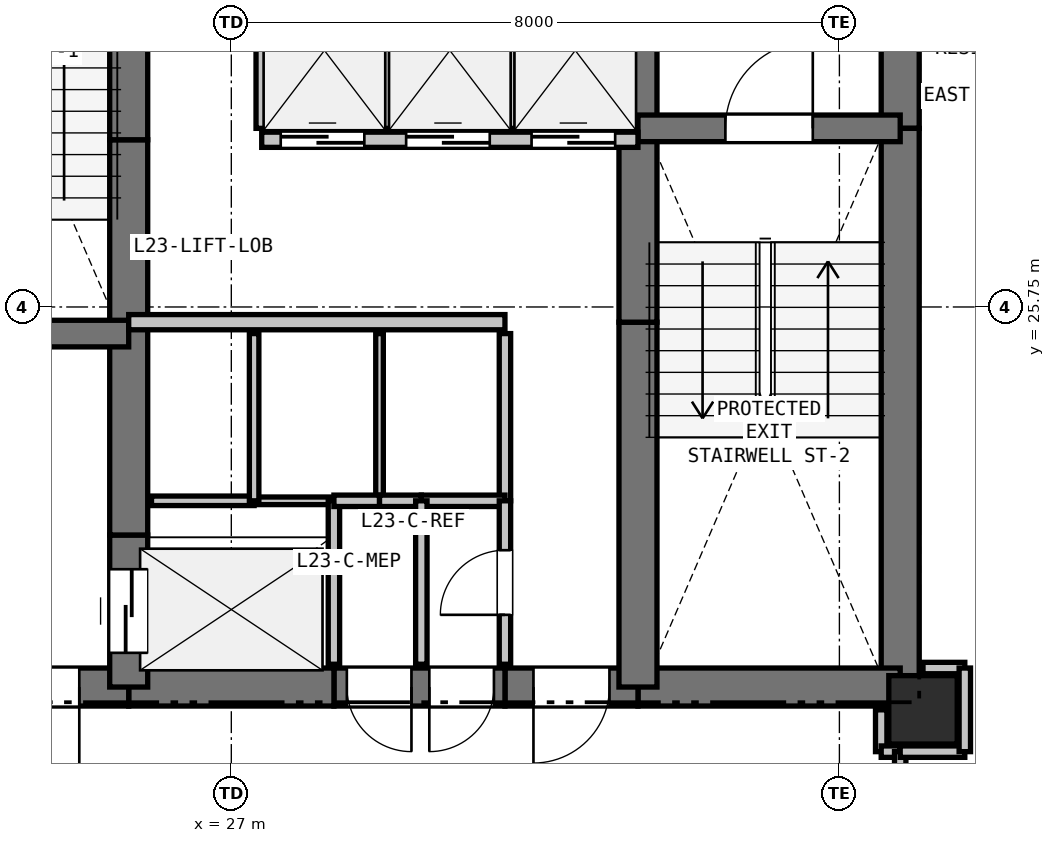
"""IFC4 building model, lengths in metres.
Left out: names, types, materials, properties, quantities, classifications, styles, units other than length and angle.
Written with IfcOpenShell. Run it as: python <this file> out.ifc"""

import sys

from ifc_helpers import new_model, si_unit, direction, frame, frame_2d, origin, origin_2d, place, context, subcontext, project, spatial, rectangle, extrude, element, fill, save


model = new_model("IFC4")
c1 = context("Model", 3, precision=1e-05, world=origin(), true_north=direction((0.0, 1.0)))
c2 = subcontext(c1, "Body", "Model", "MODEL_VIEW")
j1 = project(units=[si_unit("LENGTHUNIT", "METRE"), si_unit("PLANEANGLEUNIT", "RADIAN")], contexts=[c1])
p1 = place(None, origin())
s1 = spatial("IfcSite", under=j1, at=p1, CompositionType="ELEMENT")
p2 = place(p1, origin())
s2 = spatial("IfcBuilding", under=s1, at=p2, CompositionType="ELEMENT")
p3 = place(p2, frame((0.0, 0.0, 86.7)))
s3 = spatial("IfcBuildingStorey", under=s2, at=p3, CompositionType="ELEMENT", Elevation=86.7)
p4 = place(p3, frame((36.1, 20.45, 0.0), z_axis=(0.0, 0.0, 1.0), x_axis=(1.0, 0.0, 0.0)))
e1 = element("IfcColumn", 1, at=p4, inside=s3, PredefinedType="COLUMN", context=c2, shape_type="SweptSolid", body=[
    extrude(rectangle(XDim=0.9, YDim=0.9, at=origin_2d()), origin(), (0.0, 0.0, 1.0), 3.3),
])
p5 = place(p3, frame((35.8, 32.75, 0.0), z_axis=(0.0, 0.0, 1.0), x_axis=(0.0, -1.0, 0.0)))
e2 = element("IfcWall", 2, at=p5, inside=s3, PredefinedType="SHEAR", context=c2, shape_type="SweptSolid", body=[
    extrude(rectangle(XDim=4.65, YDim=0.5, at=frame_2d((2.325, 0.0))), origin(), (0.0, 0.0, 1.0), 3.05),
])
p6 = place(p3, frame((35.8, 28.1, 0.0), z_axis=(0.0, 0.0, 1.0), x_axis=(0.0, -1.0, 0.0)))
e3 = element("IfcWall", 3, at=p6, inside=s3, PredefinedType="SHEAR", context=c2, shape_type="SweptSolid", body=[
    extrude(rectangle(XDim=7.35, YDim=0.5, at=frame_2d((3.675, 0.0))), origin(), (0.0, 0.0, 1.0), 3.05),
])
p7 = place(p3, frame((35.8, 20.75, 0.0), z_axis=(0.0, 0.0, 1.0), x_axis=(-1.0, 0.0, 0.0)))
e4 = element("IfcWall", 4, at=p7, inside=s3, PredefinedType="SHEAR", context=c2, shape_type="SweptSolid", body=[
    extrude(rectangle(XDim=3.45, YDim=0.5, at=frame_2d((1.725, 0.0))), origin(), (0.0, 0.0, 1.0), 3.05),
])
p8 = place(p3, frame((32.35, 20.75, 0.0), z_axis=(0.0, 0.0, 1.0), x_axis=(-1.0, 0.0, 0.0)))
e5 = element("IfcWall", 5, at=p8, inside=s3, PredefinedType="SHEAR", context=c2, shape_type="SweptSolid", body=[
    extrude(rectangle(XDim=1.75, YDim=0.5, at=frame_2d((0.875, 0.0))), origin(), (0.0, 0.0, 1.0), 3.05),
])
p9 = place(p8, frame((0.375, 0.0, 0.0)))
e6 = element("IfcOpeningElement", 6, at=p9, cuts=e5, PredefinedType="OPENING", context=c2, shape_type="SweptSolid", body=[
    extrude(rectangle(XDim=1.0, YDim=2.15, at=frame_2d((0.5, 1.075))), frame((0.0, 0.26, 0.0), z_axis=(0.0, -1.0, 0.0), x_axis=(1.0, 0.0, 0.0)), (0.0, 0.0, 1.0), 0.52),
])
p10 = place(p3, frame((30.6, 20.75, 0.0), z_axis=(0.0, 0.0, 1.0), x_axis=(-1.0, 0.0, 0.0)))
e7 = element("IfcWall", 7, at=p10, inside=s3, PredefinedType="SHEAR", context=c2, shape_type="SweptSolid", body=[
    extrude(rectangle(XDim=2.25, YDim=0.5, at=frame_2d((1.125, 0.0))), origin(), (0.0, 0.0, 1.0), 3.05),
])
p11 = place(p10, frame((1.23, 0.0, 0.0)))
e8 = element("IfcOpeningElement", 8, at=p11, cuts=e7, PredefinedType="OPENING", context=c2, shape_type="SweptSolid", body=[
    extrude(rectangle(XDim=0.85, YDim=2.1, at=frame_2d((0.425, 1.05))), frame((0.0, 0.26, 0.0), z_axis=(0.0, -1.0, 0.0), x_axis=(1.0, 0.0, 0.0)), (0.0, 0.0, 1.0), 0.52),
])
p12 = place(p10, frame((0.145, 0.0, 0.0)))
e9 = element("IfcOpeningElement", 9, at=p12, cuts=e7, PredefinedType="OPENING", context=c2, shape_type="SweptSolid", body=[
    extrude(rectangle(XDim=0.85, YDim=2.1, at=frame_2d((0.425, 1.05))), frame((0.0, 0.26, 0.0), z_axis=(0.0, -1.0, 0.0), x_axis=(1.0, 0.0, 0.0)), (0.0, 0.0, 1.0), 0.52),
])
p13 = place(p3, frame((28.35, 20.75, 0.0), z_axis=(0.0, 0.0, 1.0), x_axis=(-1.0, 0.0, 0.0)))
e10 = element("IfcWall", 10, at=p13, inside=s3, PredefinedType="SHEAR", context=c2, shape_type="SweptSolid", body=[
    extrude(rectangle(XDim=2.7, YDim=0.5, at=frame_2d((1.35, 0.0))), origin(), (0.0, 0.0, 1.0), 3.05),
])
p14 = place(p3, frame((25.65, 20.75, 0.0), z_axis=(0.0, 0.0, 1.0), x_axis=(-1.0, 0.0, 0.0)))
e11 = element("IfcWall", 11, at=p14, inside=s3, PredefinedType="SHEAR", context=c2, shape_type="SweptSolid", body=[
    extrude(rectangle(XDim=3.45, YDim=0.5, at=frame_2d((1.725, 0.0))), origin(), (0.0, 0.0, 1.0), 3.05),
])
p15 = place(p14, frame((0.65, 0.0, 0.0)))
e12 = element("IfcOpeningElement", 12, at=p15, cuts=e11, PredefinedType="OPENING", context=c2, shape_type="SweptSolid", body=[
    extrude(rectangle(XDim=1.15, YDim=2.15, at=frame_2d((0.575, 1.075))), frame((0.0, 0.26, 0.0), z_axis=(0.0, -1.0, 0.0), x_axis=(1.0, 0.0, 0.0)), (0.0, 0.0, 1.0), 0.52),
])
p16 = place(p3, frame((25.65, 20.75, 0.0), z_axis=(0.0, 0.0, 1.0), x_axis=(0.0, 1.0, 0.0)))
e13 = element("IfcWall", 13, at=p16, inside=s3, PredefinedType="SHEAR", context=c2, shape_type="SweptSolid", body=[
    extrude(rectangle(XDim=2.0, YDim=0.5, at=frame_2d((1.0, 0.0))), origin(), (0.0, 0.0, 1.0), 3.05),
])
p17 = place(p16, frame((0.45, 0.0, 0.0)))
e14 = element("IfcOpeningElement", 14, at=p17, cuts=e13, PredefinedType="OPENING", context=c2, shape_type="SweptSolid", body=[
    extrude(rectangle(XDim=1.1, YDim=2.15, at=frame_2d((0.55, 1.075))), frame((0.0, 0.26, 0.0), z_axis=(0.0, -1.0, 0.0), x_axis=(1.0, 0.0, 0.0)), (0.0, 0.0, 1.0), 0.52),
])
p18 = place(p3, frame((25.65, 22.75, 0.0), z_axis=(0.0, 0.0, 1.0), x_axis=(0.0, 1.0, 0.0)))
e15 = element("IfcWall", 15, at=p18, inside=s3, PredefinedType="SHEAR", context=c2, shape_type="SweptSolid", body=[
    extrude(rectangle(XDim=2.8, YDim=0.5, at=frame_2d((1.4, 0.0))), origin(), (0.0, 0.0, 1.0), 3.05),
])
p19 = place(p3, frame((25.65, 25.55, 0.0), z_axis=(0.0, 0.0, 1.0), x_axis=(0.0, 1.0, 0.0)))
e16 = element("IfcWall", 16, at=p19, inside=s3, PredefinedType="SHEAR", context=c2, shape_type="SweptSolid", body=[
    extrude(rectangle(XDim=2.4, YDim=0.5, at=frame_2d((1.2, 0.0))), origin(), (0.0, 0.0, 1.0), 3.05),
])
for number, where, z_axis, x_axis in (
    (17, (25.65, 27.95, 0.0), (0.0, 0.0, 1.0), (0.0, 1.0, 0.0)),
    (18, (32.35, 20.75, 0.0), (0.0, 0.0, 1.0), (0.0, 1.0, 0.0)),
):
    element("IfcWall", number, at=place(p3, frame(where, z_axis=z_axis, x_axis=x_axis)), inside=s3, PredefinedType="SHEAR", context=c2, shape_type="SweptSolid", body=[
        extrude(rectangle(XDim=4.8, YDim=0.5, at=frame_2d((2.4, 0.0))), origin(), (0.0, 0.0, 1.0), 3.05),
    ])
p20 = place(p3, frame((32.35, 25.55, 0.0), z_axis=(0.0, 0.0, 1.0), x_axis=(0.0, 1.0, 0.0)))
e19 = element("IfcWall", 19, at=p20, inside=s3, PredefinedType="SHEAR", context=c2, shape_type="SweptSolid", body=[
    extrude(rectangle(XDim=2.4, YDim=0.5, at=frame_2d((1.2, 0.0))), origin(), (0.0, 0.0, 1.0), 3.05),
])
p21 = place(p3, frame((32.35, 27.95, 0.0), z_axis=(0.0, 0.0, 1.0), x_axis=(0.0, 1.0, 0.0)))
e20 = element("IfcWall", 20, at=p21, inside=s3, PredefinedType="SHEAR", context=c2, shape_type="SweptSolid", body=[
    extrude(rectangle(XDim=2.8, YDim=0.5, at=frame_2d((1.4, 0.0))), origin(), (0.0, 0.0, 1.0), 3.05),
])
p22 = place(p3, frame((22.2, 25.4, 0.0), z_axis=(0.0, 0.0, 1.0), x_axis=(1.0, 0.0, 0.0)))
e21 = element("IfcWall", 21, at=p22, inside=s3, PredefinedType="SHEAR", context=c2, shape_type="SweptSolid", body=[
    extrude(rectangle(XDim=3.45, YDim=0.35, at=frame_2d((1.725, 0.0))), origin(), (0.0, 0.0, 1.0), 3.05),
])
p23 = place(p22, frame((1.15, 0.0, 0.0)))
e22 = element("IfcOpeningElement", 22, at=p23, cuts=e21, PredefinedType="OPENING", context=c2, shape_type="SweptSolid", body=[
    extrude(rectangle(XDim=1.15, YDim=2.15, at=frame_2d((0.575, 1.075))), frame((0.0, 0.185, 0.0), z_axis=(0.0, -1.0, 0.0), x_axis=(1.0, 0.0, 0.0)), (0.0, 0.0, 1.0), 0.37),
])
p24 = place(p3, frame((32.35, 28.1, 0.0), z_axis=(0.0, 0.0, 1.0), x_axis=(1.0, 0.0, 0.0)))
e23 = element("IfcWall", 23, at=p24, inside=s3, PredefinedType="SHEAR", context=c2, shape_type="SweptSolid", body=[
    extrude(rectangle(XDim=3.45, YDim=0.35, at=frame_2d((1.725, 0.0))), origin(), (0.0, 0.0, 1.0), 3.05),
])
p25 = place(p24, frame((1.15, 0.0, 0.0)))
e24 = element("IfcOpeningElement", 24, at=p25, cuts=e23, PredefinedType="OPENING", context=c2, shape_type="SweptSolid", body=[
    extrude(rectangle(XDim=1.15, YDim=2.15, at=frame_2d((0.575, 1.075))), frame((0.0, 0.185, 0.0), z_axis=(0.0, -1.0, 0.0), x_axis=(1.0, 0.0, 0.0)), (0.0, 0.0, 1.0), 0.37),
])
p26 = place(p3, frame((25.65, 25.55, 0.0), z_axis=(0.0, 0.0, 1.0), x_axis=(1.0, 0.0, 0.0)))
e25 = element("IfcWall", 25, at=p26, inside=s3, PredefinedType="PARTITIONING", context=c2, shape_type="SweptSolid", body=[
    extrude(rectangle(XDim=4.95, YDim=0.2, at=frame_2d((2.475, 0.0))), origin(), (0.0, 0.0, 1.0), 3.05),
])
p27 = place(p3, frame((27.4, 27.95, 0.0), z_axis=(0.0, 0.0, 1.0), x_axis=(1.0, 0.0, 0.0)))
e26 = element("IfcWall", 26, at=p27, inside=s3, PredefinedType="PARTITIONING", context=c2, shape_type="SweptSolid", body=[
    extrude(rectangle(XDim=4.95, YDim=0.2, at=frame_2d((2.475, 0.0))), origin(), (0.0, 0.0, 1.0), 3.05),
])
p28 = place(p27, frame((0.25, 0.0, 0.0)))
e27 = element("IfcOpeningElement", 27, at=p28, cuts=e26, PredefinedType="OPENING", context=c2, shape_type="SweptSolid", body=[
    extrude(rectangle(XDim=1.1, YDim=2.15, at=frame_2d((0.55, 1.075))), frame((0.0, 0.11, 0.0), z_axis=(0.0, -1.0, 0.0), x_axis=(1.0, 0.0, 0.0)), (0.0, 0.0, 1.0), 0.22),
])
p29 = place(p27, frame((1.9, 0.0, 0.0)))
e28 = element("IfcOpeningElement", 28, at=p29, cuts=e26, PredefinedType="OPENING", context=c2, shape_type="SweptSolid", body=[
    extrude(rectangle(XDim=1.1, YDim=2.15, at=frame_2d((0.55, 1.075))), frame((0.0, 0.11, 0.0), z_axis=(0.0, -1.0, 0.0), x_axis=(1.0, 0.0, 0.0)), (0.0, 0.0, 1.0), 0.22),
])
p30 = place(p27, frame((3.55, 0.0, 0.0)))
e29 = element("IfcOpeningElement", 29, at=p30, cuts=e26, PredefinedType="OPENING", context=c2, shape_type="SweptSolid", body=[
    extrude(rectangle(XDim=1.1, YDim=2.15, at=frame_2d((0.55, 1.075))), frame((0.0, 0.11, 0.0), z_axis=(0.0, -1.0, 0.0), x_axis=(1.0, 0.0, 0.0)), (0.0, 0.0, 1.0), 0.22),
])
p31 = place(p3, frame((25.95, 23.2, 0.0), z_axis=(0.0, 0.0, 1.0), x_axis=(1.0, 0.0, 0.0)))
e30 = element("IfcWall", 30, at=p31, inside=s3, PredefinedType="PARTITIONING", context=c2, shape_type="SweptSolid", body=[
    extrude(rectangle(XDim=1.35, YDim=0.125, at=frame_2d((0.675, 0.0))), origin(), (0.0, 0.0, 1.0), 3.05),
])
p32 = place(p3, frame((27.3, 23.2, 0.0), z_axis=(0.0, 0.0, 1.0), x_axis=(1.0, 0.0, 0.0)))
e31 = element("IfcWall", 31, at=p32, inside=s3, PredefinedType="PARTITIONING", context=c2, shape_type="SweptSolid", body=[
    extrude(rectangle(XDim=1.05, YDim=0.1, at=frame_2d((0.525, 0.0))), origin(), (0.0, 0.0, 1.0), 3.05),
])
p33 = place(p3, frame((28.35, 23.2, 0.0), z_axis=(0.0, 0.0, 1.0), x_axis=(0.0, -1.0, 0.0)))
e32 = element("IfcWall", 32, at=p33, inside=s3, PredefinedType="PARTITIONING", context=c2, shape_type="SweptSolid", body=[
    extrude(rectangle(XDim=2.15, YDim=0.15, at=frame_2d((1.075, 0.0))), origin(), (0.0, 0.0, 1.0), 3.05),
])
p34 = place(p3, frame((27.3, 25.4, 0.0), z_axis=(0.0, 0.0, 1.0), x_axis=(0.0, -1.0, 0.0)))
e33 = element("IfcWall", 33, at=p34, inside=s3, PredefinedType="PARTITIONING", context=c2, shape_type="SweptSolid", body=[
    extrude(rectangle(XDim=2.2, YDim=0.125, at=frame_2d((1.1, 0.0))), origin(), (0.0, 0.0, 1.0), 3.05),
])
p35 = place(p3, frame((28.95, 25.4, 0.0), z_axis=(0.0, 0.0, 1.0), x_axis=(0.0, -1.0, 0.0)))
e34 = element("IfcWall", 34, at=p35, inside=s3, PredefinedType="PARTITIONING", context=c2, shape_type="SweptSolid", body=[
    extrude(rectangle(XDim=2.2, YDim=0.1, at=frame_2d((1.1, 0.0))), origin(), (0.0, 0.0, 1.0), 3.05),
])
p36 = place(p3, frame((28.95, 23.2, 0.0), z_axis=(0.0, 0.0, 1.0), x_axis=(-1.0, 0.0, 0.0)))
e35 = element("IfcWall", 35, at=p36, inside=s3, PredefinedType="PARTITIONING", context=c2, shape_type="SweptSolid", body=[
    extrude(rectangle(XDim=0.6, YDim=0.15, at=frame_2d((0.3, 0.0))), origin(), (0.0, 0.0, 1.0), 3.05),
])
p37 = place(p3, frame((30.6, 25.4, 0.0), z_axis=(0.0, 0.0, 1.0), x_axis=(0.0, -1.0, 0.0)))
e36 = element("IfcWall", 36, at=p37, inside=s3, PredefinedType="PARTITIONING", context=c2, shape_type="SweptSolid", body=[
    extrude(rectangle(XDim=2.2, YDim=0.15, at=frame_2d((1.1, 0.0))), origin(), (0.0, 0.0, 1.0), 3.05),
])
p38 = place(p3, frame((30.6, 23.2, 0.0), z_axis=(0.0, 0.0, 1.0), x_axis=(-1.0, 0.0, 0.0)))
e37 = element("IfcWall", 37, at=p38, inside=s3, PredefinedType="PARTITIONING", context=c2, shape_type="SweptSolid", body=[
    extrude(rectangle(XDim=1.1, YDim=0.15, at=frame_2d((0.55, 0.0))), origin(), (0.0, 0.0, 1.0), 3.05),
])
p39 = place(p3, frame((29.5, 23.2, 0.0), z_axis=(0.0, 0.0, 1.0), x_axis=(-1.0, 0.0, 0.0)))
e38 = element("IfcWall", 38, at=p39, inside=s3, PredefinedType="PARTITIONING", context=c2, shape_type="SweptSolid", body=[
    extrude(rectangle(XDim=0.55, YDim=0.15, at=frame_2d((0.275, 0.0))), origin(), (0.0, 0.0, 1.0), 3.05),
])
p40 = place(p3, frame((29.05, 30.3, 0.0), z_axis=(0.0, 0.0, 1.0), x_axis=(0.0, -1.0, 0.0)))
e39 = element("IfcWall", 39, at=p40, inside=s3, PredefinedType="PARTITIONING", context=c2, shape_type="SweptSolid", body=[
    extrude(rectangle(XDim=2.2, YDim=0.125, at=frame_2d((1.1, 0.0))), origin(), (0.0, 0.0, 1.0), 3.05),
])
p41 = place(p3, frame((27.4, 28.1, 0.0), z_axis=(0.0, 0.0, 1.0), x_axis=(0.0, 1.0, 0.0)))
e40 = element("IfcWall", 40, at=p41, inside=s3, PredefinedType="PARTITIONING", context=c2, shape_type="SweptSolid", body=[
    extrude(rectangle(XDim=2.2, YDim=0.15, at=frame_2d((1.1, 0.0))), origin(), (0.0, 0.0, 1.0), 3.05),
])
p42 = place(p3, frame((30.7, 30.3, 0.0), z_axis=(0.0, 0.0, 1.0), x_axis=(0.0, -1.0, 0.0)))
e41 = element("IfcWall", 41, at=p42, inside=s3, PredefinedType="PARTITIONING", context=c2, shape_type="SweptSolid", body=[
    extrude(rectangle(XDim=2.2, YDim=0.1, at=frame_2d((1.1, 0.0))), origin(), (0.0, 0.0, 1.0), 3.05),
])
p43 = place(p3, frame((30.6, 21.05, 0.0), z_axis=(0.0, 0.0, 1.0), x_axis=(0.0, 1.0, 0.0)))
e42 = element("IfcWall", 42, at=p43, inside=s3, PredefinedType="PARTITIONING", context=c2, shape_type="SweptSolid", body=[
    extrude(rectangle(XDim=2.15, YDim=0.15, at=frame_2d((1.075, 0.0))), origin(), (0.0, 0.0, 1.0), 3.05),
])
p44 = place(p43, frame((0.65, 0.0, 0.0)))
e43 = element("IfcOpeningElement", 43, at=p44, cuts=e42, PredefinedType="OPENING", context=c2, shape_type="SweptSolid", body=[
    extrude(rectangle(XDim=0.85, YDim=2.1, at=frame_2d((0.425, 1.05))), frame((0.0, 0.085, 0.0), z_axis=(0.0, -1.0, 0.0), x_axis=(1.0, 0.0, 0.0)), (0.0, 0.0, 1.0), 0.17),
])
p45 = place(p3, frame((35.55, 20.45, 0.0), z_axis=(0.0, 0.0, 1.0), x_axis=(0.0, -1.0, 0.0)))
e44 = element("IfcWall", 44, at=p45, inside=s3, PredefinedType="PARTITIONING", context=c2, shape_type="SweptSolid", body=[
    extrude(rectangle(XDim=0.55, YDim=0.15, at=frame_2d((0.275, 0.0))), origin(), (0.0, 0.0, 1.0), 2.498),
])
p46 = place(p3, frame((35.55, 19.9, 0.0), z_axis=(0.0, 0.0, 1.0), x_axis=(1.0, 0.0, 0.0)))
e45 = element("IfcWall", 45, at=p46, inside=s3, PredefinedType="PARTITIONING", context=c2, shape_type="SweptSolid", body=[
    extrude(rectangle(XDim=0.25, YDim=0.15, at=frame_2d((0.125, 0.0))), origin(), (0.0, 0.0, 1.0), 3.05),
])
p47 = place(p3, frame((35.8, 19.9, 0.0), z_axis=(0.0, 0.0, 1.0), x_axis=(0.0, -1.0, 0.0)))
e46 = element("IfcWall", 46, at=p47, inside=s3, PredefinedType="PARTITIONING", context=c2, shape_type="SweptSolid", body=[
    extrude(rectangle(XDim=1.75, YDim=0.15, at=frame_2d((0.875, 0.0))), origin(), (0.0, 0.0, 1.0), 3.05),
])
p48 = place(p47, frame((0.375, 0.0, 0.0)))
e47 = element("IfcOpeningElement", 47, at=p48, cuts=e46, PredefinedType="OPENING", context=c2, shape_type="SweptSolid", body=[
    extrude(rectangle(XDim=1.0, YDim=2.15, at=frame_2d((0.5, 1.075))), frame((0.0, 0.085, 0.0), z_axis=(0.0, -1.0, 0.0), x_axis=(1.0, 0.0, 0.0)), (0.0, 0.0, 1.0), 0.17),
])
p49 = place(p3, frame((36.65, 21.0, 0.0), z_axis=(0.0, 0.0, 1.0), x_axis=(-1.0, 0.0, 0.0)))
e48 = element("IfcWall", 48, at=p49, inside=s3, PredefinedType="PARTITIONING", context=c2, shape_type="SweptSolid", body=[
    extrude(rectangle(XDim=0.55, YDim=0.15, at=frame_2d((0.275, 0.0))), origin(), (0.0, 0.0, 1.0), 2.498),
])
p50 = place(p3, frame((35.8, 19.9, 0.0), z_axis=(0.0, 0.0, 1.0), x_axis=(1.0, 0.0, 0.0)))
e49 = element("IfcWall", 49, at=p50, inside=s3, PredefinedType="PARTITIONING", context=c2, shape_type="SweptSolid", body=[
    extrude(rectangle(XDim=0.85, YDim=0.15, at=frame_2d((0.425, 0.0))), origin(), (0.0, 0.0, 1.0), 2.423),
])
p51 = place(p3, frame((36.65, 19.9, 0.0), z_axis=(0.0, 0.0, 1.0), x_axis=(0.0, 1.0, 0.0)))
e50 = element("IfcWall", 50, at=p51, inside=s3, PredefinedType="PARTITIONING", context=c2, shape_type="SweptSolid", body=[
    extrude(rectangle(XDim=1.1, YDim=0.15, at=frame_2d((0.55, 0.0))), origin(), (0.0, 0.0, 1.0), 3.05),
])
p52 = place(p3, frame((29.5, 23.2, 0.0), z_axis=(0.0, 0.0, 1.0), x_axis=(0.0, -1.0, 0.0)))
e51 = element("IfcWall", 51, at=p52, inside=s3, PredefinedType="PARTITIONING", context=c2, shape_type="SweptSolid", body=[
    extrude(rectangle(XDim=2.15, YDim=0.15, at=frame_2d((1.075, 0.0))), origin(), (0.0, 0.0, 1.0), 3.05),
])
p53 = place(p28, origin())
e52 = element("IfcDoor", 52, at=p53, inside=s3, OperationType="SLIDING_TO_LEFT", PredefinedType="DOOR", context=c2, shape_type="SweptSolid", body=[
    extrude(rectangle(XDim=1.1, YDim=2.15, at=frame_2d((0.55, 1.075))), frame((0.0, 0.025, 0.0), z_axis=(0.0, -1.0, 0.0), x_axis=(1.0, 0.0, 0.0)), (0.0, 0.0, 1.0), 0.05),
])
fill(e27, e52)
p54 = place(p29, origin())
e53 = element("IfcDoor", 53, at=p54, inside=s3, OperationType="SLIDING_TO_LEFT", PredefinedType="DOOR", context=c2, shape_type="SweptSolid", body=[
    extrude(rectangle(XDim=1.1, YDim=2.15, at=frame_2d((0.55, 1.075))), frame((0.0, 0.025, 0.0), z_axis=(0.0, -1.0, 0.0), x_axis=(1.0, 0.0, 0.0)), (0.0, 0.0, 1.0), 0.05),
])
fill(e28, e53)
p55 = place(p30, origin())
e54 = element("IfcDoor", 54, at=p55, inside=s3, OperationType="SLIDING_TO_LEFT", PredefinedType="DOOR", context=c2, shape_type="SweptSolid", body=[
    extrude(rectangle(XDim=1.1, YDim=2.15, at=frame_2d((0.55, 1.075))), frame((0.0, 0.025, 0.0), z_axis=(0.0, -1.0, 0.0), x_axis=(1.0, 0.0, 0.0)), (0.0, 0.0, 1.0), 0.05),
])
fill(e29, e54)
p56 = place(p9, origin())
e55 = element("IfcDoor", 55, at=p56, inside=s3, OperationType="SINGLE_SWING_RIGHT", PredefinedType="DOOR", context=c2, shape_type="SweptSolid", body=[
    extrude(rectangle(XDim=1.0, YDim=2.15, at=frame_2d((0.5, 1.075))), frame((0.0, 0.025, 0.0), z_axis=(0.0, -1.0, 0.0), x_axis=(1.0, 0.0, 0.0)), (0.0, 0.0, 1.0), 0.05),
])
fill(e6, e55)
p57 = place(p17, origin())
e56 = element("IfcDoor", 56, at=p57, inside=s3, OperationType="SLIDING_TO_LEFT", PredefinedType="DOOR", context=c2, shape_type="SweptSolid", body=[
    extrude(rectangle(XDim=1.1, YDim=2.15, at=frame_2d((0.55, 1.075))), frame((0.0, 0.025, 0.0), z_axis=(0.0, -1.0, 0.0), x_axis=(1.0, 0.0, 0.0)), (0.0, 0.0, 1.0), 0.05),
])
fill(e14, e56)
p58 = place(p25, origin())
e57 = element("IfcDoor", 57, at=p58, inside=s3, OperationType="SINGLE_SWING_RIGHT", PredefinedType="DOOR", context=c2, shape_type="SweptSolid", body=[
    extrude(rectangle(XDim=1.15, YDim=2.15, at=frame_2d((0.575, 1.075))), frame((0.0, 0.025, 0.0), z_axis=(0.0, -1.0, 0.0), x_axis=(1.0, 0.0, 0.0)), (0.0, 0.0, 1.0), 0.05),
])
fill(e24, e57)
p59 = place(p15, origin())
e58 = element("IfcDoor", 58, at=p59, inside=s3, OperationType="SINGLE_SWING_LEFT", PredefinedType="DOOR", context=c2, shape_type="SweptSolid", body=[
    extrude(rectangle(XDim=1.15, YDim=2.15, at=frame_2d((0.575, 1.075))), frame((0.0, 0.025, 0.0), z_axis=(0.0, -1.0, 0.0), x_axis=(1.0, 0.0, 0.0)), (0.0, 0.0, 1.0), 0.05),
])
fill(e12, e58)
p60 = place(p44, origin())
e59 = element("IfcDoor", 59, at=p60, inside=s3, OperationType="SINGLE_SWING_LEFT", PredefinedType="DOOR", context=c2, shape_type="SweptSolid", body=[
    extrude(rectangle(XDim=0.85, YDim=2.1, at=frame_2d((0.425, 1.05))), frame((0.0, 0.025, 0.0), z_axis=(0.0, -1.0, 0.0), x_axis=(1.0, 0.0, 0.0)), (0.0, 0.0, 1.0), 0.05),
])
fill(e43, e59)
p61 = place(p11, origin())
e60 = element("IfcDoor", 60, at=p61, inside=s3, OperationType="SINGLE_SWING_LEFT", PredefinedType="DOOR", context=c2, shape_type="SweptSolid", body=[
    extrude(rectangle(XDim=0.85, YDim=2.1, at=frame_2d((0.425, 1.05))), frame((0.0, 0.025, 0.0), z_axis=(0.0, -1.0, 0.0), x_axis=(1.0, 0.0, 0.0)), (0.0, 0.0, 1.0), 0.05),
])
fill(e8, e60)
p62 = place(p12, origin())
e61 = element("IfcDoor", 61, at=p62, inside=s3, OperationType="SINGLE_SWING_RIGHT", PredefinedType="DOOR", context=c2, shape_type="SweptSolid", body=[
    extrude(rectangle(XDim=0.85, YDim=2.1, at=frame_2d((0.425, 1.05))), frame((0.0, 0.025, 0.0), z_axis=(0.0, -1.0, 0.0), x_axis=(1.0, 0.0, 0.0)), (0.0, 0.0, 1.0), 0.05),
])
fill(e9, e61)
save(model, sys.argv[1])
